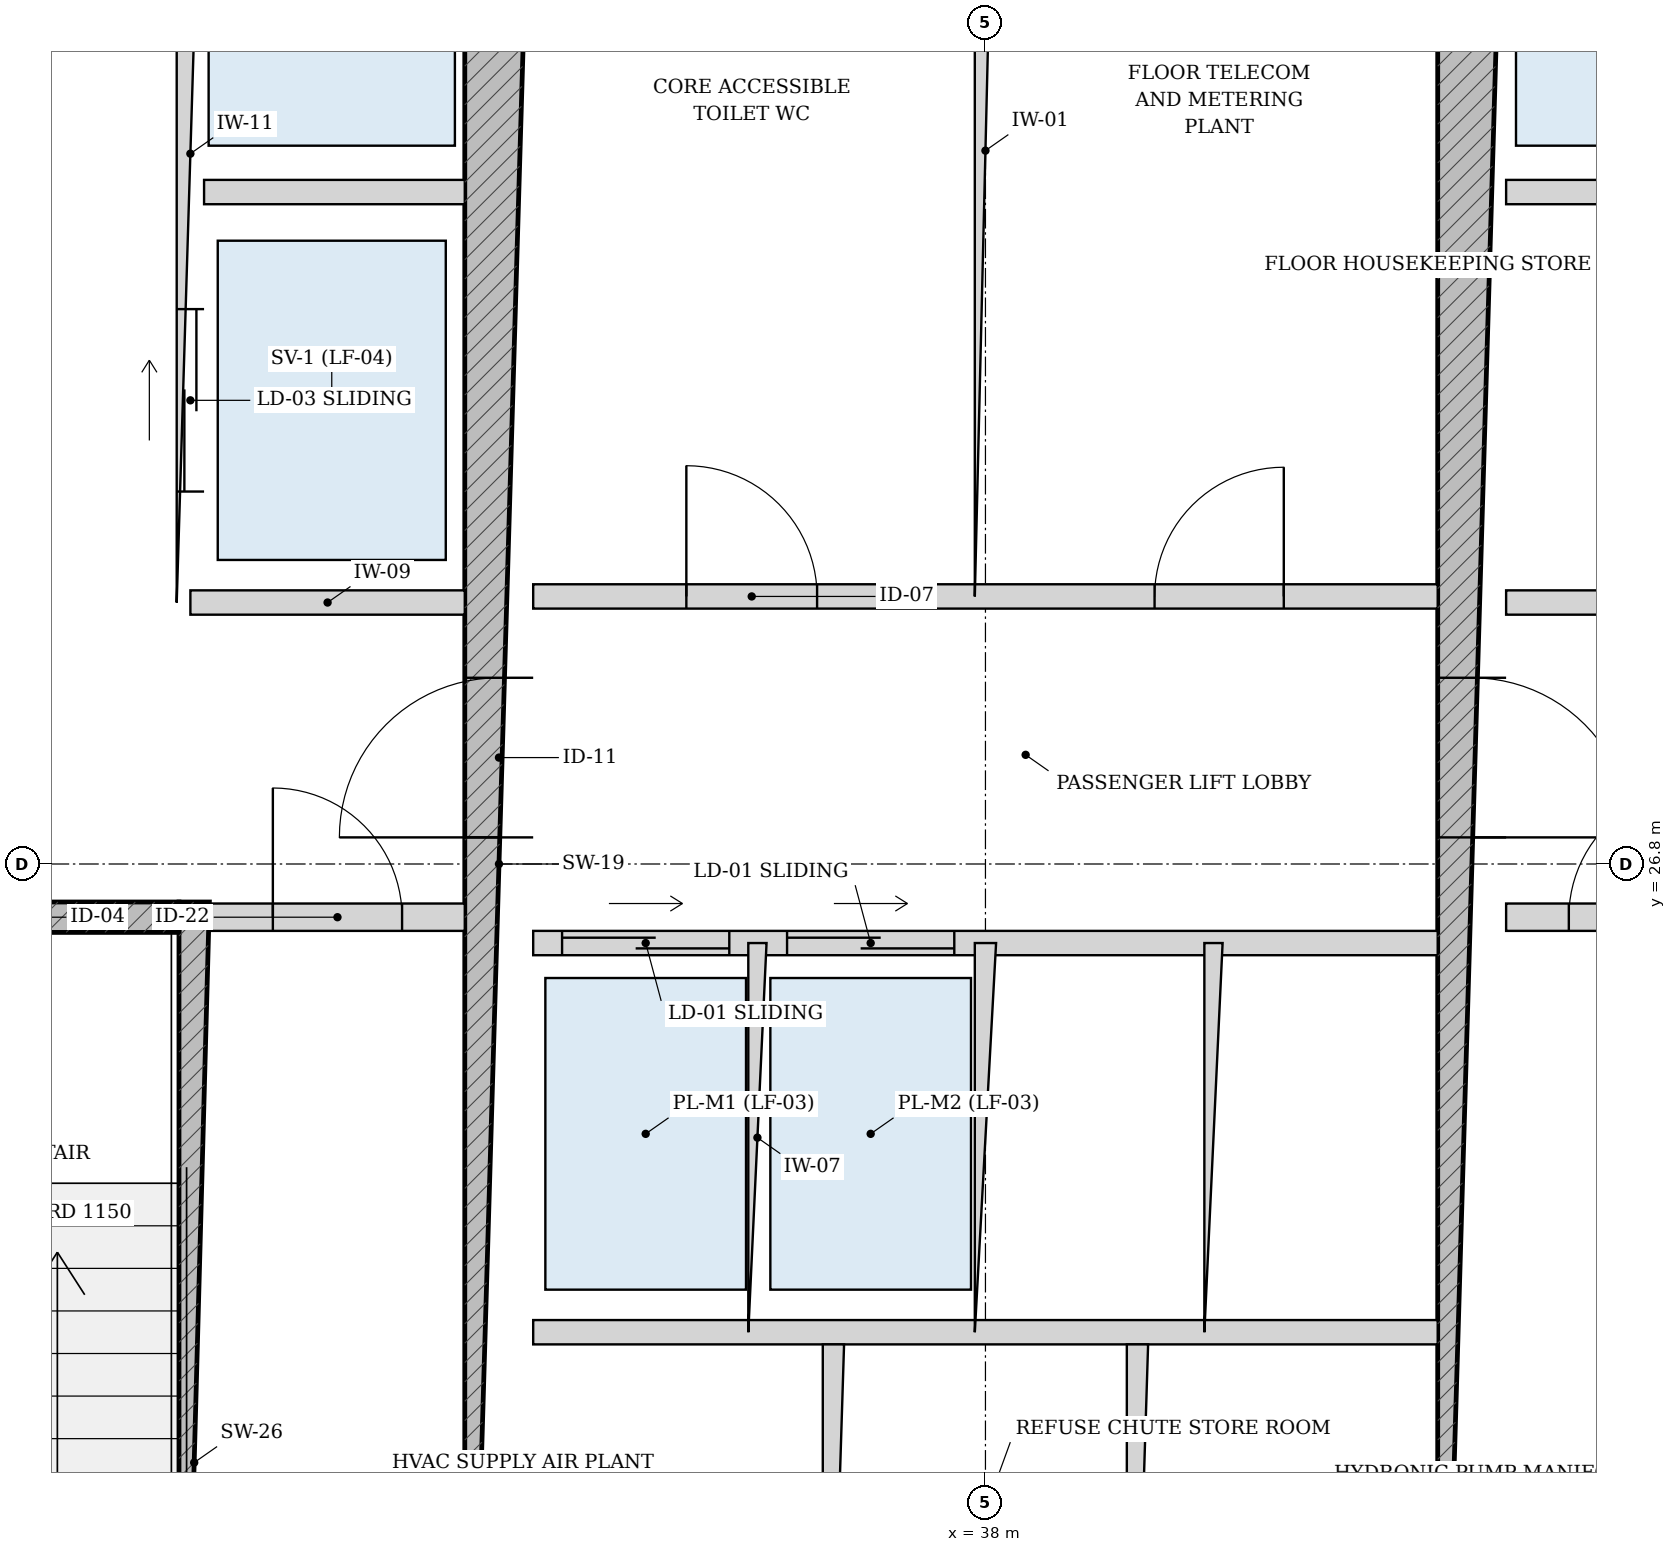
"""IFC4 building model, lengths in metres.
Left out: names, types, materials, properties, quantities, classifications, styles, units other than length and angle.
Written with IfcOpenShell. Run it as: python <this file> out.ifc"""

import sys

from ifc_helpers import new_model, si_unit, direction, frame, frame_2d, origin, place, context, subcontext, project, spatial, rectangle, extrude, source, transform, mapped, element, fill, save


model = new_model("IFC4")
c1 = context("Model", 3, precision=1e-05, world=origin(), true_north=direction((-0.2419218956, 0.970295726276)))
c2 = subcontext(c1, "Body", "Model", "MODEL_VIEW")
j1 = project(units=[si_unit("LENGTHUNIT", "METRE"), si_unit("PLANEANGLEUNIT", "RADIAN")], contexts=[c1])
p1 = place(None, origin())
s1 = spatial("IfcSite", under=j1, at=p1, CompositionType="ELEMENT")
p2 = place(p1, origin())
s2 = spatial("IfcBuilding", under=s1, at=p2, CompositionType="ELEMENT")
p3 = place(p2, frame((0.0, 0.0, 135.4)))
s3 = spatial("IfcBuildingStorey", under=s2, at=p3, CompositionType="ELEMENT", Elevation=135.4)
p4 = place(p3, frame((32.795, 19.175, 0.0), z_axis=(0.0, 0.0, 1.0), x_axis=(0.0, 1.0, 0.0)))
e1 = element("IfcWall", 1, at=p4, inside=s3, PredefinedType="SOLIDWALL", context=c2, shape_type="SweptSolid", body=[
    extrude(rectangle(XDim=7.375, YDim=0.2, at=frame_2d((3.688, 0.0))), origin(), (0.0, 0.0, 1.0), 3.33),
])
p5 = place(p3, frame((29.375, 26.45, 0.0), z_axis=(0.0, 0.0, 1.0), x_axis=(1.0, 0.0, 0.0)))
e2 = element("IfcWall", 2, at=p5, inside=s3, PredefinedType="SOLIDWALL", context=c2, shape_type="SweptSolid", body=[
    extrude(rectangle(XDim=3.32, YDim=0.2, at=frame_2d((1.66, 0.0))), origin(), (0.0, 0.0, 1.0), 3.33),
])
p6 = place(p5, frame((1.185, 0.0, 0.0)))
e3 = element("IfcOpeningElement", 3, at=p6, cuts=e2, PredefinedType="OPENING", context=c2, shape_type="SweptSolid", body=[
    extrude(rectangle(XDim=0.95, YDim=2.15, at=frame_2d((0.475, 1.075))), frame((0.0, 0.11, 0.0), z_axis=(0.0, -1.0, 0.0), x_axis=(1.0, 0.0, 0.0)), (0.0, 0.0, 1.0), 0.22),
])
p7 = place(p3, frame((34.8, 19.175, 0.0), z_axis=(0.0, 0.0, 1.0), x_axis=(0.0, 1.0, 0.0)))
e4 = element("IfcWall", 4, at=p7, inside=s3, PredefinedType="SHEAR", context=c2, shape_type="SweptSolid", body=[
    extrude(rectangle(XDim=15.25, YDim=0.45, at=frame_2d((7.625, 0.0))), origin(), (0.0, 0.0, 1.0), 3.33),
])
p8 = place(p7, frame((7.8, 0.0, 0.0)))
e5 = element("IfcOpeningElement", 5, at=p8, cuts=e4, PredefinedType="OPENING", context=c2, shape_type="SweptSolid", body=[
    extrude(rectangle(XDim=1.05, YDim=2.15, at=frame_2d((0.525, 1.075))), frame((0.0, 0.235, 0.0), z_axis=(0.0, -1.0, 0.0), x_axis=(1.0, 0.0, 0.0)), (0.0, 0.0, 1.0), 0.47),
])
p9 = place(p3, frame((41.2, 19.175, 0.0), z_axis=(0.0, 0.0, 1.0), x_axis=(0.0, 1.0, 0.0)))
e6 = element("IfcWall", 6, at=p9, inside=s3, PredefinedType="SHEAR", context=c2, shape_type="SweptSolid", body=[
    extrude(rectangle(XDim=15.25, YDim=0.45, at=frame_2d((7.625, 0.0))), origin(), (0.0, 0.0, 1.0), 3.33),
])
p10 = place(p9, frame((7.8, 0.0, 0.0)))
e7 = element("IfcOpeningElement", 7, at=p10, cuts=e6, PredefinedType="OPENING", context=c2, shape_type="SweptSolid", body=[
    extrude(rectangle(XDim=1.05, YDim=2.15, at=frame_2d((0.525, 1.075))), frame((0.0, 0.235, 0.0), z_axis=(0.0, -1.0, 0.0), x_axis=(1.0, 0.0, 0.0)), (0.0, 0.0, 1.0), 0.47),
])
p11 = place(p3, frame((32.9, 26.45, 0.0), z_axis=(0.0, 0.0, 1.0), x_axis=(1.0, 0.0, 0.0)))
e8 = element("IfcWall", 8, at=p11, inside=s3, PredefinedType="PARTITIONING", context=c2, shape_type="SweptSolid", body=[
    extrude(rectangle(XDim=1.675, YDim=0.18, at=frame_2d((0.837, 0.0))), origin(), (0.0, 0.0, 1.0), 3.33),
])
p12 = place(p11, frame((0.413, 0.0, 0.0)))
e9 = element("IfcOpeningElement", 9, at=p12, cuts=e8, PredefinedType="OPENING", context=c2, shape_type="SweptSolid", body=[
    extrude(rectangle(XDim=0.85, YDim=2.1, at=frame_2d((0.425, 1.05))), frame((0.0, 0.1, 0.0), z_axis=(0.0, -1.0, 0.0), x_axis=(1.0, 0.0, 0.0)), (0.0, 0.0, 1.0), 0.2),
])
p13 = place(p3, frame((41.425, 26.45, 0.0), z_axis=(0.0, 0.0, 1.0), x_axis=(1.0, 0.0, 0.0)))
e10 = element("IfcWall", 10, at=p13, inside=s3, PredefinedType="PARTITIONING", context=c2, shape_type="SweptSolid", body=[
    extrude(rectangle(XDim=1.675, YDim=0.18, at=frame_2d((0.837, 0.0))), origin(), (0.0, 0.0, 1.0), 3.33),
])
p14 = place(p13, frame((0.413, 0.0, 0.0)))
e11 = element("IfcOpeningElement", 11, at=p14, cuts=e10, PredefinedType="OPENING", context=c2, shape_type="SweptSolid", body=[
    extrude(rectangle(XDim=0.85, YDim=2.1, at=frame_2d((0.425, 1.05))), frame((0.0, 0.1, 0.0), z_axis=(0.0, -1.0, 0.0), x_axis=(1.0, 0.0, 0.0)), (0.0, 0.0, 1.0), 0.2),
])
p15 = place(p3, frame((32.77, 28.52, 0.0), z_axis=(0.0, 0.0, 1.0), x_axis=(0.0, 1.0, 0.0)))
e12 = element("IfcWall", 12, at=p15, inside=s3, PredefinedType="PARTITIONING", context=c2, shape_type="SweptSolid", body=[
    extrude(rectangle(XDim=5.905, YDim=0.18, at=frame_2d((2.953, 0.0))), origin(), (0.0, 0.0, 1.0), 3.33),
])
p16 = place(p15, frame((3.655, 0.0, 0.0)))
e13 = element("IfcOpeningElement", 13, at=p16, cuts=e12, PredefinedType="OPENING", context=c2, shape_type="SweptSolid", body=[
    extrude(rectangle(XDim=1.15, YDim=2.2, at=frame_2d((0.575, 1.1))), frame((0.0, 0.1, 0.0), z_axis=(0.0, -1.0, 0.0), x_axis=(1.0, 0.0, 0.0)), (0.0, 0.0, 1.0), 0.2),
])
p17 = place(p15, frame((0.73, 0.0, 0.0)))
e14 = element("IfcOpeningElement", 14, at=p17, cuts=e12, PredefinedType="OPENING", context=c2, shape_type="SweptSolid", body=[
    extrude(rectangle(XDim=1.2, YDim=2.25, at=frame_2d((0.6, 1.125))), frame((0.0, 0.1, 0.0), z_axis=(0.0, -1.0, 0.0), x_axis=(1.0, 0.0, 0.0)), (0.0, 0.0, 1.0), 0.2),
])
p18 = place(p3, frame((32.86, 31.22, 0.0), z_axis=(0.0, 0.0, 1.0), x_axis=(1.0, 0.0, 0.0)))
e15 = element("IfcWall", 15, at=p18, inside=s3, PredefinedType="PARTITIONING", context=c2, shape_type="SweptSolid", body=[
    extrude(rectangle(XDim=1.715, YDim=0.16, at=frame_2d((0.857, 0.0))), origin(), (0.0, 0.0, 1.0), 3.33),
])
p19 = place(p3, frame((32.77, 28.52, 0.0), z_axis=(0.0, 0.0, 1.0), x_axis=(1.0, 0.0, 0.0)))
e16 = element("IfcWall", 16, at=p19, inside=s3, PredefinedType="PARTITIONING", context=c2, shape_type="SweptSolid", body=[
    extrude(rectangle(XDim=1.805, YDim=0.16, at=frame_2d((0.902, 0.0))), origin(), (0.0, 0.0, 1.0), 3.33),
])
p20 = place(p3, frame((41.425, 31.22, 0.0), z_axis=(0.0, 0.0, 1.0), x_axis=(1.0, 0.0, 0.0)))
e17 = element("IfcWall", 17, at=p20, inside=s3, PredefinedType="PARTITIONING", context=c2, shape_type="SweptSolid", body=[
    extrude(rectangle(XDim=1.715, YDim=0.16, at=frame_2d((0.857, 0.0))), origin(), (0.0, 0.0, 1.0), 3.33),
])
p21 = place(p3, frame((41.425, 28.52, 0.0), z_axis=(0.0, 0.0, 1.0), x_axis=(1.0, 0.0, 0.0)))
e18 = element("IfcWall", 18, at=p21, inside=s3, PredefinedType="PARTITIONING", context=c2, shape_type="SweptSolid", body=[
    extrude(rectangle(XDim=1.805, YDim=0.16, at=frame_2d((0.902, 0.0))), origin(), (0.0, 0.0, 1.0), 3.33),
])
p22 = place(p3, frame((35.025, 28.56, 0.0), z_axis=(0.0, 0.0, 1.0), x_axis=(1.0, 0.0, 0.0)))
e19 = element("IfcWall", 19, at=p22, inside=s3, PredefinedType="PARTITIONING", context=c2, shape_type="SweptSolid", body=[
    extrude(rectangle(XDim=5.95, YDim=0.16, at=frame_2d((2.975, 0.0))), origin(), (0.0, 0.0, 1.0), 3.33),
])
p23 = place(p22, frame((1.008, 0.0, 0.0)))
e20 = element("IfcOpeningElement", 20, at=p23, cuts=e19, PredefinedType="OPENING", context=c2, shape_type="SweptSolid", body=[
    extrude(rectangle(XDim=0.86, YDim=2.1, at=frame_2d((0.43, 1.05))), frame((0.0, 0.09, 0.0), z_axis=(0.0, -1.0, 0.0), x_axis=(1.0, 0.0, 0.0)), (0.0, 0.0, 1.0), 0.18),
])
p24 = place(p22, frame((4.087, 0.0, 0.0)))
e21 = element("IfcOpeningElement", 21, at=p24, cuts=e19, PredefinedType="OPENING", context=c2, shape_type="SweptSolid", body=[
    extrude(rectangle(XDim=0.85, YDim=2.1, at=frame_2d((0.425, 1.05))), frame((0.0, 0.09, 0.0), z_axis=(0.0, -1.0, 0.0), x_axis=(1.0, 0.0, 0.0)), (0.0, 0.0, 1.0), 0.18),
])
p25 = place(p3, frame((38.0, 28.56, 0.0), z_axis=(0.0, 0.0, 1.0), x_axis=(0.0, 1.0, 0.0)))
e22 = element("IfcWall", 22, at=p25, inside=s3, PredefinedType="PARTITIONING", context=c2, shape_type="SweptSolid", body=[
    extrude(rectangle(XDim=5.865, YDim=0.14, at=frame_2d((2.933, 0.0))), origin(), (0.0, 0.0, 1.0), 3.33),
])
p26 = place(p3, frame((35.025, 26.28, 0.0), z_axis=(0.0, 0.0, 1.0), x_axis=(1.0, 0.0, 0.0)))
e23 = element("IfcWall", 23, at=p26, inside=s3, PredefinedType="PARTITIONING", context=c2, shape_type="SweptSolid", body=[
    extrude(rectangle(XDim=5.95, YDim=0.16, at=frame_2d((2.975, 0.0))), origin(), (0.0, 0.0, 1.0), 3.33),
])
p27 = place(p26, frame((0.19, 0.0, 0.0)))
e24 = element("IfcOpeningElement", 24, at=p27, cuts=e23, PredefinedType="OPENING", context=c2, shape_type="SweptSolid", body=[
    extrude(rectangle(XDim=1.1, YDim=2.2, at=frame_2d((0.55, 1.1))), frame((0.0, 0.09, 0.0), z_axis=(0.0, -1.0, 0.0), x_axis=(1.0, 0.0, 0.0)), (0.0, 0.0, 1.0), 0.18),
])
p28 = place(p26, frame((1.67, 0.0, 0.0)))
e25 = element("IfcOpeningElement", 25, at=p28, cuts=e23, PredefinedType="OPENING", context=c2, shape_type="SweptSolid", body=[
    extrude(rectangle(XDim=1.1, YDim=2.2, at=frame_2d((0.55, 1.1))), frame((0.0, 0.09, 0.0), z_axis=(0.0, -1.0, 0.0), x_axis=(1.0, 0.0, 0.0)), (0.0, 0.0, 1.0), 0.18),
])
p29 = place(p3, frame((35.025, 23.72, 0.0), z_axis=(0.0, 0.0, 1.0), x_axis=(1.0, 0.0, 0.0)))
e26 = element("IfcWall", 26, at=p29, inside=s3, PredefinedType="PARTITIONING", context=c2, shape_type="SweptSolid", body=[
    extrude(rectangle(XDim=5.95, YDim=0.16, at=frame_2d((2.975, 0.0))), origin(), (0.0, 0.0, 1.0), 3.33),
])
p30 = place(p3, frame((36.5, 23.72, 0.0), z_axis=(0.0, 0.0, 1.0), x_axis=(0.0, 1.0, 0.0)))
e27 = element("IfcWall", 27, at=p30, inside=s3, PredefinedType="PARTITIONING", context=c2, shape_type="SweptSolid", body=[
    extrude(rectangle(XDim=2.56, YDim=0.12, at=frame_2d((1.28, 0.0))), origin(), (0.0, 0.0, 1.0), 3.33),
])
p31 = place(p3, frame((38.0, 23.72, 0.0), z_axis=(0.0, 0.0, 1.0), x_axis=(0.0, 1.0, 0.0)))
e28 = element("IfcWall", 28, at=p31, inside=s3, PredefinedType="PARTITIONING", context=c2, shape_type="SweptSolid", body=[
    extrude(rectangle(XDim=2.56, YDim=0.14, at=frame_2d((1.28, 0.0))), origin(), (0.0, 0.0, 1.0), 3.33),
])
p32 = place(p3, frame((39.5, 23.72, 0.0), z_axis=(0.0, 0.0, 1.0), x_axis=(0.0, 1.0, 0.0)))
e29 = element("IfcWall", 29, at=p32, inside=s3, PredefinedType="PARTITIONING", context=c2, shape_type="SweptSolid", body=[
    extrude(rectangle(XDim=2.56, YDim=0.12, at=frame_2d((1.28, 0.0))), origin(), (0.0, 0.0, 1.0), 3.33),
])
p33 = place(p3, frame((37.0, 19.175, 0.0), z_axis=(0.0, 0.0, 1.0), x_axis=(0.0, 1.0, 0.0)))
e30 = element("IfcWall", 30, at=p33, inside=s3, PredefinedType="PARTITIONING", context=c2, shape_type="SweptSolid", body=[
    extrude(rectangle(XDim=4.465, YDim=0.14, at=frame_2d((2.232, 0.0))), origin(), (0.0, 0.0, 1.0), 3.33),
])
p34 = place(p33, frame((1.808, 0.0, 0.0)))
e31 = element("IfcOpeningElement", 31, at=p34, cuts=e30, PredefinedType="OPENING", context=c2, shape_type="SweptSolid", body=[
    extrude(rectangle(XDim=0.85, YDim=2.1, at=frame_2d((0.425, 1.05))), frame((0.0, 0.08, 0.0), z_axis=(0.0, -1.0, 0.0), x_axis=(1.0, 0.0, 0.0)), (0.0, 0.0, 1.0), 0.16),
])
p35 = place(p3, frame((39.0, 19.175, 0.0), z_axis=(0.0, 0.0, 1.0), x_axis=(0.0, 1.0, 0.0)))
e32 = element("IfcWall", 32, at=p35, inside=s3, PredefinedType="PARTITIONING", context=c2, shape_type="SweptSolid", body=[
    extrude(rectangle(XDim=4.465, YDim=0.14, at=frame_2d((2.232, 0.0))), origin(), (0.0, 0.0, 1.0), 3.33),
])
p36 = place(p35, frame((1.808, 0.0, 0.0)))
e33 = element("IfcOpeningElement", 33, at=p36, cuts=e32, PredefinedType="OPENING", context=c2, shape_type="SweptSolid", body=[
    extrude(rectangle(XDim=0.85, YDim=2.1, at=frame_2d((0.425, 1.05))), frame((0.0, 0.08, 0.0), z_axis=(0.0, -1.0, 0.0), x_axis=(1.0, 0.0, 0.0)), (0.0, 0.0, 1.0), 0.16),
])
m1 = source(origin(), c2, "Body", "SweptSolid", [
    extrude(rectangle(XDim=1.05, YDim=2.15, at=frame_2d((0.525, 1.075))), frame((0.0, 0.025, 0.0), z_axis=(0.0, -1.0, 0.0), x_axis=(1.0, 0.0, 0.0)), (0.0, 0.0, 1.0), 0.05),
])
p37 = place(p8, origin())
e34 = element("IfcDoor", 34, at=p37, inside=s3, OperationType="SINGLE_SWING_LEFT", PredefinedType="DOOR", context=c2, shape_type="MappedRepresentation", body=[
    mapped(m1, transform((0.0, 0.0, 0.0), scale=1.0)),
])
fill(e5, e34)
p38 = place(p10, frame((1.05, 0.0, 0.0), z_axis=(0.0, 0.0, 1.0), x_axis=(-1.0, 0.0, 0.0)))
e35 = element("IfcDoor", 35, at=p38, inside=s3, OperationType="SINGLE_SWING_RIGHT", PredefinedType="DOOR", context=c2, shape_type="MappedRepresentation", body=[
    mapped(m1, transform((0.0, 0.0, 0.0), scale=1.0)),
])
fill(e7, e35)
m2 = source(origin(), c2, "Body", "SweptSolid", [
    extrude(rectangle(XDim=0.85, YDim=2.1, at=frame_2d((0.425, 1.05))), frame((0.0, 0.025, 0.0), z_axis=(0.0, -1.0, 0.0), x_axis=(1.0, 0.0, 0.0)), (0.0, 0.0, 1.0), 0.05),
])
p39 = place(p12, origin())
e36 = element("IfcDoor", 36, at=p39, inside=s3, OperationType="SINGLE_SWING_LEFT", PredefinedType="DOOR", context=c2, shape_type="MappedRepresentation", body=[
    mapped(m2, transform((0.0, 0.0, 0.0), scale=1.0)),
])
fill(e9, e36)
p40 = place(p14, origin())
e37 = element("IfcDoor", 37, at=p40, inside=s3, OperationType="SINGLE_SWING_RIGHT", PredefinedType="DOOR", context=c2, shape_type="MappedRepresentation", body=[
    mapped(m2, transform((0.0, 0.0, 0.0), scale=1.0)),
])
fill(e11, e37)
m3 = source(origin(), c2, "Body", "SweptSolid", [
    extrude(rectangle(XDim=0.86, YDim=2.1, at=frame_2d((0.43, 1.05))), frame((0.0, 0.025, 0.0), z_axis=(0.0, -1.0, 0.0), x_axis=(1.0, 0.0, 0.0)), (0.0, 0.0, 1.0), 0.05),
])
p41 = place(p23, origin())
e38 = element("IfcDoor", 38, at=p41, inside=s3, OperationType="SINGLE_SWING_LEFT", PredefinedType="DOOR", context=c2, shape_type="MappedRepresentation", body=[
    mapped(m3, transform((0.0, 0.0, 0.0), scale=1.0)),
])
fill(e20, e38)
p42 = place(p24, origin())
e39 = element("IfcDoor", 39, at=p42, inside=s3, OperationType="SINGLE_SWING_RIGHT", PredefinedType="DOOR", context=c2, shape_type="MappedRepresentation", body=[
    mapped(m2, transform((0.0, 0.0, 0.0), scale=1.0)),
])
fill(e21, e39)
m4 = source(origin(), c2, "Body", "SweptSolid", [
    extrude(rectangle(XDim=1.2, YDim=2.25, at=frame_2d((0.6, 1.125))), frame((0.0, 0.025, 0.0), z_axis=(0.0, -1.0, 0.0), x_axis=(1.0, 0.0, 0.0)), (0.0, 0.0, 1.0), 0.05),
])
p43 = place(p17, origin())
e40 = element("IfcDoor", 40, at=p43, inside=s3, OperationType="DOUBLE_DOOR_SLIDING", PredefinedType="DOOR", context=c2, shape_type="MappedRepresentation", body=[
    mapped(m4, transform((0.0, 0.0, 0.0), scale=1.0)),
])
fill(e14, e40)
m5 = source(origin(), c2, "Body", "SweptSolid", [
    extrude(rectangle(XDim=1.1, YDim=2.2, at=frame_2d((0.55, 1.1))), frame((0.0, 0.025, 0.0), z_axis=(0.0, -1.0, 0.0), x_axis=(1.0, 0.0, 0.0)), (0.0, 0.0, 1.0), 0.05),
])
p44 = place(p27, origin())
e41 = element("IfcDoor", 41, at=p44, inside=s3, OperationType="DOUBLE_DOOR_SLIDING", PredefinedType="DOOR", context=c2, shape_type="MappedRepresentation", body=[
    mapped(m5, transform((0.0, 0.0, 0.0), scale=1.0)),
])
fill(e24, e41)
p45 = place(p28, origin())
e42 = element("IfcDoor", 42, at=p45, inside=s3, OperationType="DOUBLE_DOOR_SLIDING", PredefinedType="DOOR", context=c2, shape_type="MappedRepresentation", body=[
    mapped(m5, transform((0.0, 0.0, 0.0), scale=1.0)),
])
fill(e25, e42)
save(model, sys.argv[1])
